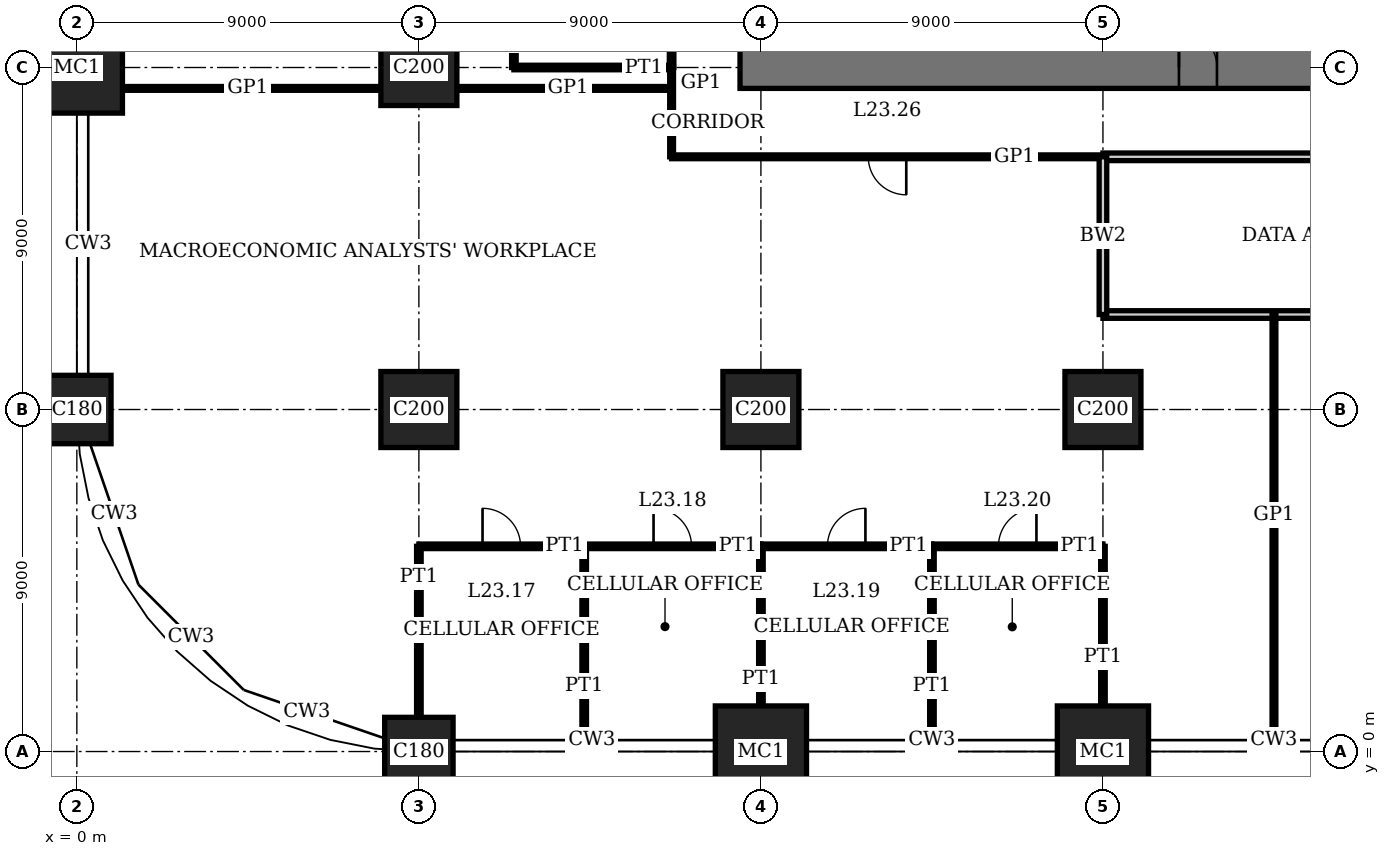
"""IFC4 building model, lengths in metres.
Left out: names, types, materials, properties, quantities, classifications, styles, units other than length and angle.
Written with IfcOpenShell. Run it as: python <this file> out.ifc"""

import sys

from ifc_helpers import new_model, si_unit, direction, frame, frame_2d, origin, origin_2d, place, context, subcontext, project, spatial, rectangle, extrude, element, fill, save


model = new_model("IFC4")
c1 = context("Model", 3, precision=1e-05, world=origin(), true_north=direction((0.0, 1.0)))
c2 = subcontext(c1, "Body", "Model", "MODEL_VIEW")
j1 = project(units=[si_unit("LENGTHUNIT", "METRE"), si_unit("PLANEANGLEUNIT", "RADIAN")], contexts=[c1])
p1 = place(None, origin())
s1 = spatial("IfcSite", under=j1, at=p1, CompositionType="ELEMENT")
p2 = place(p1, origin())
s2 = spatial("IfcBuilding", under=s1, at=p2, CompositionType="ELEMENT")
p3 = place(p2, frame((0.0, 0.0, 97.0)))
s3 = spatial("IfcBuildingStorey", under=s2, at=p3, CompositionType="ELEMENT", Elevation=97.0)
p4 = place(p3, frame((0.0, 9.0, 0.0), z_axis=(0.0, 0.0, 1.0), x_axis=(1.0, 0.0, 0.0)))
e1 = element("IfcColumn", 1, at=p4, inside=s3, PredefinedType="COLUMN", context=c2, shape_type="SweptSolid", body=[
    extrude(rectangle(XDim=1.8, YDim=1.8, at=origin_2d()), origin(), (0.0, 0.0, 1.0), 4.0),
])
p5 = place(p3, frame((0.0, 18.0, 0.0), z_axis=(0.0, 0.0, 1.0), x_axis=(1.0, 0.0, 0.0)))
e2 = element("IfcColumn", 2, at=p5, inside=s3, PredefinedType="COLUMN", context=c2, shape_type="SweptSolid", body=[
    extrude(rectangle(XDim=2.4, YDim=2.4, at=origin_2d()), origin(), (0.0, 0.0, 1.0), 4.0),
])
p6 = place(p3, frame((9.0, 0.0, 0.0), z_axis=(0.0, 0.0, 1.0), x_axis=(1.0, 0.0, 0.0)))
e3 = element("IfcColumn", 3, at=p6, inside=s3, PredefinedType="COLUMN", context=c2, shape_type="SweptSolid", body=[
    extrude(rectangle(XDim=1.8, YDim=1.8, at=origin_2d()), origin(), (0.0, 0.0, 1.0), 4.0),
])
for number, where, z_axis, x_axis in (
    (4, (9.0, 9.0, 0.0), (0.0, 0.0, 1.0), (1.0, 0.0, 0.0)),
    (5, (9.0, 18.0, 0.0), (0.0, 0.0, 1.0), (1.0, 0.0, 0.0)),
):
    element("IfcColumn", number, at=place(p3, frame(where, z_axis=z_axis, x_axis=x_axis)), inside=s3, PredefinedType="COLUMN", context=c2, shape_type="SweptSolid", body=[
        extrude(rectangle(XDim=2.0, YDim=2.0, at=origin_2d()), origin(), (0.0, 0.0, 1.0), 4.0),
    ])
p7 = place(p3, frame((18.0, 0.0, 0.0), z_axis=(0.0, 0.0, 1.0), x_axis=(1.0, 0.0, 0.0)))
e6 = element("IfcColumn", 6, at=p7, inside=s3, PredefinedType="COLUMN", context=c2, shape_type="SweptSolid", body=[
    extrude(rectangle(XDim=2.4, YDim=2.4, at=origin_2d()), origin(), (0.0, 0.0, 1.0), 4.0),
])
p8 = place(p3, frame((18.0, 9.0, 0.0), z_axis=(0.0, 0.0, 1.0), x_axis=(1.0, 0.0, 0.0)))
e7 = element("IfcColumn", 7, at=p8, inside=s3, PredefinedType="COLUMN", context=c2, shape_type="SweptSolid", body=[
    extrude(rectangle(XDim=2.0, YDim=2.0, at=origin_2d()), origin(), (0.0, 0.0, 1.0), 4.0),
])
p9 = place(p3, frame((27.0, 0.0, 0.0), z_axis=(0.0, 0.0, 1.0), x_axis=(1.0, 0.0, 0.0)))
e8 = element("IfcColumn", 8, at=p9, inside=s3, PredefinedType="COLUMN", context=c2, shape_type="SweptSolid", body=[
    extrude(rectangle(XDim=2.4, YDim=2.4, at=origin_2d()), origin(), (0.0, 0.0, 1.0), 4.0),
])
p10 = place(p3, frame((27.0, 9.0, 0.0), z_axis=(0.0, 0.0, 1.0), x_axis=(1.0, 0.0, 0.0)))
e9 = element("IfcColumn", 9, at=p10, inside=s3, PredefinedType="COLUMN", context=c2, shape_type="SweptSolid", body=[
    extrude(rectangle(XDim=2.0, YDim=2.0, at=origin_2d()), origin(), (0.0, 0.0, 1.0), 4.0),
])
p11 = place(p3, frame((17.45, 18.0, 0.0), z_axis=(0.0, 0.0, 1.0), x_axis=(1.0, 0.0, 0.0)))
e10 = element("IfcWall", 10, at=p11, inside=s3, PredefinedType="SHEAR", context=c2, shape_type="SweptSolid", body=[
    extrude(rectangle(XDim=28.1, YDim=1.1, at=frame_2d((14.05, 0.0))), origin(), (0.0, 0.0, 1.0), 4.0),
])
p12 = place(p11, frame((11.55, 0.0, 0.0)))
e11 = element("IfcOpeningElement", 11, at=p12, cuts=e10, PredefinedType="OPENING", context=c2, shape_type="SweptSolid", body=[
    extrude(rectangle(XDim=1.0, YDim=2.4, at=frame_2d((0.5, 1.2))), frame((0.0, 0.56, 0.0), z_axis=(0.0, -1.0, 0.0), x_axis=(1.0, 0.0, 0.0)), (0.0, 0.0, 1.0), 1.12),
])
p13 = place(p11, frame((16.55, 0.0, 0.0)))
e12 = element("IfcOpeningElement", 12, at=p13, cuts=e10, PredefinedType="OPENING", context=c2, shape_type="SweptSolid", body=[
    extrude(rectangle(XDim=1.0, YDim=2.4, at=frame_2d((0.5, 1.2))), frame((0.0, 0.56, 0.0), z_axis=(0.0, -1.0, 0.0), x_axis=(1.0, 0.0, 0.0)), (0.0, 0.0, 1.0), 1.12),
])
p14 = place(p11, frame((20.0, 0.0, 0.0)))
e13 = element("IfcOpeningElement", 13, at=p14, cuts=e10, PredefinedType="OPENING", context=c2, shape_type="SweptSolid", body=[
    extrude(rectangle(XDim=1.1, YDim=2.4, at=frame_2d((0.55, 1.2))), frame((0.0, 0.56, 0.0), z_axis=(0.0, -1.0, 0.0), x_axis=(1.0, 0.0, 0.0)), (0.0, 0.0, 1.0), 1.12),
])
p15 = place(p11, frame((24.05, 0.0, 0.0)))
e14 = element("IfcOpeningElement", 14, at=p15, cuts=e10, PredefinedType="OPENING", context=c2, shape_type="SweptSolid", body=[
    extrude(rectangle(XDim=1.0, YDim=2.4, at=frame_2d((0.5, 1.2))), frame((0.0, 0.56, 0.0), z_axis=(0.0, -1.0, 0.0), x_axis=(1.0, 0.0, 0.0)), (0.0, 0.0, 1.0), 1.12),
])
p16 = place(p3, frame((9.0, 5.4, 0.0), z_axis=(0.0, 0.0, 1.0), x_axis=(1.0, 0.0, 0.0)))
e15 = element("IfcWall", 15, at=p16, inside=s3, PredefinedType="PARTITIONING", context=c2, shape_type="SweptSolid", body=[
    extrude(rectangle(XDim=4.35, YDim=0.12, at=frame_2d((2.175, 0.0))), origin(), (0.0, 0.0, 1.0), 3.75),
])
p17 = place(p16, frame((1.675, 0.0, 0.0)))
e16 = element("IfcOpeningElement", 16, at=p17, cuts=e15, PredefinedType="OPENING", context=c2, shape_type="SweptSolid", body=[
    extrude(rectangle(XDim=1.0, YDim=2.4, at=frame_2d((0.5, 1.2))), frame((0.0, 0.07, 0.0), z_axis=(0.0, -1.0, 0.0), x_axis=(1.0, 0.0, 0.0)), (0.0, 0.0, 1.0), 0.14),
])
p18 = place(p3, frame((13.35, 5.4, 0.0), z_axis=(0.0, 0.0, 1.0), x_axis=(1.0, 0.0, 0.0)))
e17 = element("IfcWall", 17, at=p18, inside=s3, PredefinedType="PARTITIONING", context=c2, shape_type="SweptSolid", body=[
    extrude(rectangle(XDim=4.65, YDim=0.12, at=frame_2d((2.325, 0.0))), origin(), (0.0, 0.0, 1.0), 3.75),
])
p19 = place(p18, frame((1.825, 0.0, 0.0)))
e18 = element("IfcOpeningElement", 18, at=p19, cuts=e17, PredefinedType="OPENING", context=c2, shape_type="SweptSolid", body=[
    extrude(rectangle(XDim=1.0, YDim=2.4, at=frame_2d((0.5, 1.2))), frame((0.0, 0.07, 0.0), z_axis=(0.0, -1.0, 0.0), x_axis=(1.0, 0.0, 0.0)), (0.0, 0.0, 1.0), 0.14),
])
p20 = place(p3, frame((18.0, 5.4, 0.0), z_axis=(0.0, 0.0, 1.0), x_axis=(1.0, 0.0, 0.0)))
e19 = element("IfcWall", 19, at=p20, inside=s3, PredefinedType="PARTITIONING", context=c2, shape_type="SweptSolid", body=[
    extrude(rectangle(XDim=4.5, YDim=0.12, at=frame_2d((2.25, 0.0))), origin(), (0.0, 0.0, 1.0), 3.75),
])
p21 = place(p20, frame((1.75, 0.0, 0.0)))
e20 = element("IfcOpeningElement", 20, at=p21, cuts=e19, PredefinedType="OPENING", context=c2, shape_type="SweptSolid", body=[
    extrude(rectangle(XDim=1.0, YDim=2.4, at=frame_2d((0.5, 1.2))), frame((0.0, 0.07, 0.0), z_axis=(0.0, -1.0, 0.0), x_axis=(1.0, 0.0, 0.0)), (0.0, 0.0, 1.0), 0.14),
])
p22 = place(p3, frame((22.5, 5.4, 0.0), z_axis=(0.0, 0.0, 1.0), x_axis=(1.0, 0.0, 0.0)))
e21 = element("IfcWall", 21, at=p22, inside=s3, PredefinedType="PARTITIONING", context=c2, shape_type="SweptSolid", body=[
    extrude(rectangle(XDim=4.5, YDim=0.12, at=frame_2d((2.25, 0.0))), origin(), (0.0, 0.0, 1.0), 3.75),
])
p23 = place(p22, frame((1.75, 0.0, 0.0)))
e22 = element("IfcOpeningElement", 22, at=p23, cuts=e21, PredefinedType="OPENING", context=c2, shape_type="SweptSolid", body=[
    extrude(rectangle(XDim=1.0, YDim=2.4, at=frame_2d((0.5, 1.2))), frame((0.0, 0.07, 0.0), z_axis=(0.0, -1.0, 0.0), x_axis=(1.0, 0.0, 0.0)), (0.0, 0.0, 1.0), 0.14),
])
p24 = place(p3, frame((27.0, 11.5, 0.0), z_axis=(0.0, 0.0, 1.0), x_axis=(1.0, 0.0, 0.0)))
e23 = element("IfcWall", 23, at=p24, inside=s3, PredefinedType="SOLIDWALL", context=c2, shape_type="SweptSolid", body=[
    extrude(rectangle(XDim=13.5, YDim=0.2, at=frame_2d((6.75, 0.0))), origin(), (0.0, 0.0, 1.0), 3.75),
])
p25 = place(p24, frame((6.25, 0.0, 0.0)))
e24 = element("IfcOpeningElement", 24, at=p25, cuts=e23, PredefinedType="OPENING", context=c2, shape_type="SweptSolid", body=[
    extrude(rectangle(XDim=1.0, YDim=2.4, at=frame_2d((0.5, 1.2))), frame((0.0, 0.11, 0.0), z_axis=(0.0, -1.0, 0.0), x_axis=(1.0, 0.0, 0.0)), (0.0, 0.0, 1.0), 0.22),
])
p26 = place(p3, frame((27.0, 15.65, 0.0), z_axis=(0.0, 0.0, 1.0), x_axis=(1.0, 0.0, 0.0)))
e25 = element("IfcWall", 25, at=p26, inside=s3, PredefinedType="SOLIDWALL", context=c2, shape_type="SweptSolid", body=[
    extrude(rectangle(XDim=13.5, YDim=0.2, at=frame_2d((6.75, 0.0))), origin(), (0.0, 0.0, 1.0), 3.75),
])
p27 = place(p3, frame((15.65, 15.65, 0.0), z_axis=(0.0, 0.0, 1.0), x_axis=(1.0, 0.0, 0.0)))
e26 = element("IfcWall", 26, at=p27, inside=s3, PredefinedType="PARTITIONING", context=c2, shape_type="SweptSolid", body=[
    extrude(rectangle(XDim=11.35, YDim=0.1, at=frame_2d((5.675, 0.0))), origin(), (0.0, 0.0, 1.0), 3.75),
])
p28 = place(p27, frame((5.175, 0.0, 0.0)))
e27 = element("IfcOpeningElement", 27, at=p28, cuts=e26, PredefinedType="OPENING", context=c2, shape_type="SweptSolid", body=[
    extrude(rectangle(XDim=1.0, YDim=2.4, at=frame_2d((0.5, 1.2))), frame((0.0, 0.06, 0.0), z_axis=(0.0, -1.0, 0.0), x_axis=(1.0, 0.0, 0.0)), (0.0, 0.0, 1.0), 0.12),
])
p29 = place(p3, frame((1.2, 17.45, 0.0), z_axis=(0.0, 0.0, 1.0), x_axis=(1.0, 0.0, 0.0)))
e28 = element("IfcWall", 28, at=p29, inside=s3, PredefinedType="PARTITIONING", context=c2, shape_type="SweptSolid", body=[
    extrude(rectangle(XDim=6.8, YDim=0.1, at=frame_2d((3.4, 0.0))), origin(), (0.0, 0.0, 1.0), 3.75),
])
p30 = place(p3, frame((10.0, 17.45, 0.0), z_axis=(0.0, 0.0, 1.0), x_axis=(1.0, 0.0, 0.0)))
e29 = element("IfcWall", 29, at=p30, inside=s3, PredefinedType="PARTITIONING", context=c2, shape_type="SweptSolid", body=[
    extrude(rectangle(XDim=5.65, YDim=0.1, at=frame_2d((2.825, 0.0))), origin(), (0.0, 0.0, 1.0), 3.75),
])
p31 = place(p3, frame((11.5, 18.0, 0.0), z_axis=(0.0, 0.0, 1.0), x_axis=(1.0, 0.0, 0.0)))
e30 = element("IfcWall", 30, at=p31, inside=s3, PredefinedType="PARTITIONING", context=c2, shape_type="SweptSolid", body=[
    extrude(rectangle(XDim=4.15, YDim=0.12, at=frame_2d((2.075, 0.0))), origin(), (0.0, 0.0, 1.0), 3.05),
])
p32 = place(p3, frame((9.0, 0.9, 0.0), z_axis=(0.0, 0.0, 1.0), x_axis=(0.0, 1.0, 0.0)))
e31 = element("IfcWall", 31, at=p32, inside=s3, PredefinedType="PARTITIONING", context=c2, shape_type="SweptSolid", body=[
    extrude(rectangle(XDim=4.5, YDim=0.12, at=frame_2d((2.25, 0.0))), origin(), (0.0, 0.0, 1.0), 3.05),
])
p33 = place(p3, frame((11.5, 18.0, 0.0), z_axis=(0.0, 0.0, 1.0), x_axis=(0.0, 1.0, 0.0)))
e32 = element("IfcWall", 32, at=p33, inside=s3, PredefinedType="PARTITIONING", context=c2, shape_type="SweptSolid", body=[
    extrude(rectangle(XDim=4.5, YDim=0.12, at=frame_2d((2.25, 0.0))), origin(), (0.0, 0.0, 1.0), 3.75),
])
p34 = place(p33, frame((1.75, 0.0, 0.0)))
e33 = element("IfcOpeningElement", 33, at=p34, cuts=e32, PredefinedType="OPENING", context=c2, shape_type="SweptSolid", body=[
    extrude(rectangle(XDim=1.0, YDim=2.4, at=frame_2d((0.5, 1.2))), frame((0.0, 0.07, 0.0), z_axis=(0.0, -1.0, 0.0), x_axis=(1.0, 0.0, 0.0)), (0.0, 0.0, 1.0), 0.14),
])
p35 = place(p3, frame((13.35, 0.31, 0.0), z_axis=(0.0, 0.0, 1.0), x_axis=(0.0, 1.0, 0.0)))
e34 = element("IfcWall", 34, at=p35, inside=s3, PredefinedType="PARTITIONING", context=c2, shape_type="SweptSolid", body=[
    extrude(rectangle(XDim=5.09, YDim=0.12, at=frame_2d((2.545, 0.0))), origin(), (0.0, 0.0, 1.0), 3.75),
])
p36 = place(p3, frame((15.65, 18.0, 0.0), z_axis=(0.0, 0.0, 1.0), x_axis=(0.0, 1.0, 0.0)))
e35 = element("IfcWall", 35, at=p36, inside=s3, PredefinedType="PARTITIONING", context=c2, shape_type="SweptSolid", body=[
    extrude(rectangle(XDim=4.5, YDim=0.12, at=frame_2d((2.25, 0.0))), origin(), (0.0, 0.0, 1.0), 3.75),
])
p37 = place(p3, frame((15.65, 15.65, 0.0), z_axis=(0.0, 0.0, 1.0), x_axis=(0.0, 1.0, 0.0)))
e36 = element("IfcWall", 36, at=p37, inside=s3, PredefinedType="PARTITIONING", context=c2, shape_type="SweptSolid", body=[
    extrude(rectangle(XDim=2.35, YDim=0.1, at=frame_2d((1.175, 0.0))), origin(), (0.0, 0.0, 1.0), 3.75),
])
p38 = place(p3, frame((18.0, 1.2, 0.0), z_axis=(0.0, 0.0, 1.0), x_axis=(0.0, 1.0, 0.0)))
e37 = element("IfcWall", 37, at=p38, inside=s3, PredefinedType="PARTITIONING", context=c2, shape_type="SweptSolid", body=[
    extrude(rectangle(XDim=4.2, YDim=0.12, at=frame_2d((2.1, 0.0))), origin(), (0.0, 0.0, 1.0), 3.05),
])
p39 = place(p3, frame((22.5, 0.31, 0.0), z_axis=(0.0, 0.0, 1.0), x_axis=(0.0, 1.0, 0.0)))
e38 = element("IfcWall", 38, at=p39, inside=s3, PredefinedType="PARTITIONING", context=c2, shape_type="SweptSolid", body=[
    extrude(rectangle(XDim=5.09, YDim=0.12, at=frame_2d((2.545, 0.0))), origin(), (0.0, 0.0, 1.0), 3.75),
])
p40 = place(p3, frame((27.0, 11.5, 0.0), z_axis=(0.0, 0.0, 1.0), x_axis=(0.0, 1.0, 0.0)))
e39 = element("IfcWall", 39, at=p40, inside=s3, PredefinedType="SOLIDWALL", context=c2, shape_type="SweptSolid", body=[
    extrude(rectangle(XDim=4.15, YDim=0.2, at=frame_2d((2.075, 0.0))), origin(), (0.0, 0.0, 1.0), 3.05),
])
p41 = place(p3, frame((27.0, 1.2, 0.0), z_axis=(0.0, 0.0, 1.0), x_axis=(0.0, 1.0, 0.0)))
e40 = element("IfcWall", 40, at=p41, inside=s3, PredefinedType="PARTITIONING", context=c2, shape_type="SweptSolid", body=[
    extrude(rectangle(XDim=4.2, YDim=0.12, at=frame_2d((2.1, 0.0))), origin(), (0.0, 0.0, 1.0), 3.05),
])
p42 = place(p3, frame((31.5, 0.31, 0.0), z_axis=(0.0, 0.0, 1.0), x_axis=(0.0, 1.0, 0.0)))
e41 = element("IfcWall", 41, at=p42, inside=s3, PredefinedType="PARTITIONING", context=c2, shape_type="SweptSolid", body=[
    extrude(rectangle(XDim=11.2, YDim=0.1, at=frame_2d((5.6, 0.0))), origin(), (0.0, 0.0, 1.0), 3.75),
])
p43 = place(p12, origin())
e42 = element("IfcDoor", 42, at=p43, inside=s3, OperationType="SINGLE_SWING_RIGHT", PredefinedType="DOOR", context=c2, shape_type="SweptSolid", body=[
    extrude(rectangle(XDim=1.0, YDim=2.4, at=frame_2d((0.5, 1.2))), frame((0.0, 0.025, 0.0), z_axis=(0.0, -1.0, 0.0), x_axis=(1.0, 0.0, 0.0)), (0.0, 0.0, 1.0), 0.05),
    extrude(rectangle(XDim=0.04, YDim=2.4, at=frame_2d((0.02, 1.2))), frame((0.0, 0.4, 0.0), z_axis=(0.0, -1.0, 0.0), x_axis=(1.0, 0.0, 0.0)), (0.0, 0.0, 1.0), 0.8),
    extrude(rectangle(XDim=0.04, YDim=2.4, at=frame_2d((0.98, 1.2))), frame((0.0, 0.4, 0.0), z_axis=(0.0, -1.0, 0.0), x_axis=(1.0, 0.0, 0.0)), (0.0, 0.0, 1.0), 0.8),
    extrude(rectangle(XDim=1.0, YDim=0.04, at=frame_2d((0.5, 2.38))), frame((0.0, 0.4, 0.0), z_axis=(0.0, -1.0, 0.0), x_axis=(1.0, 0.0, 0.0)), (0.0, 0.0, 1.0), 0.8),
])
fill(e11, e42)
p44 = place(p17, origin())
e43 = element("IfcDoor", 43, at=p44, inside=s3, OperationType="SINGLE_SWING_RIGHT", PredefinedType="DOOR", context=c2, shape_type="SweptSolid", body=[
    extrude(rectangle(XDim=1.0, YDim=2.4, at=frame_2d((0.5, 1.2))), frame((0.0, 0.025, 0.0), z_axis=(0.0, -1.0, 0.0), x_axis=(1.0, 0.0, 0.0)), (0.0, 0.0, 1.0), 0.05),
])
fill(e16, e43)
p45 = place(p19, origin())
e44 = element("IfcDoor", 44, at=p45, inside=s3, OperationType="SINGLE_SWING_RIGHT", PredefinedType="DOOR", context=c2, shape_type="SweptSolid", body=[
    extrude(rectangle(XDim=1.0, YDim=2.4, at=frame_2d((0.5, 1.2))), frame((0.0, 0.025, 0.0), z_axis=(0.0, -1.0, 0.0), x_axis=(1.0, 0.0, 0.0)), (0.0, 0.0, 1.0), 0.05),
])
fill(e18, e44)
p46 = place(p21, origin())
e45 = element("IfcDoor", 45, at=p46, inside=s3, OperationType="SINGLE_SWING_LEFT", PredefinedType="DOOR", context=c2, shape_type="SweptSolid", body=[
    extrude(rectangle(XDim=1.0, YDim=2.4, at=frame_2d((0.5, 1.2))), frame((0.0, 0.025, 0.0), z_axis=(0.0, -1.0, 0.0), x_axis=(1.0, 0.0, 0.0)), (0.0, 0.0, 1.0), 0.05),
])
fill(e20, e45)
p47 = place(p23, origin())
e46 = element("IfcDoor", 46, at=p47, inside=s3, OperationType="SINGLE_SWING_LEFT", PredefinedType="DOOR", context=c2, shape_type="SweptSolid", body=[
    extrude(rectangle(XDim=1.0, YDim=2.4, at=frame_2d((0.5, 1.2))), frame((0.0, 0.025, 0.0), z_axis=(0.0, -1.0, 0.0), x_axis=(1.0, 0.0, 0.0)), (0.0, 0.0, 1.0), 0.05),
])
fill(e22, e46)
p48 = place(p28, origin())
e47 = element("IfcDoor", 47, at=p48, inside=s3, OperationType="SINGLE_SWING_RIGHT", PredefinedType="DOOR", context=c2, shape_type="SweptSolid", body=[
    extrude(rectangle(XDim=1.0, YDim=2.4, at=frame_2d((0.5, 1.2))), frame((0.0, 0.02, 0.0), z_axis=(0.0, -1.0, 0.0), x_axis=(1.0, 0.0, 0.0)), (0.0, 0.0, 1.0), 0.04),
])
fill(e27, e47)
save(model, sys.argv[1])
